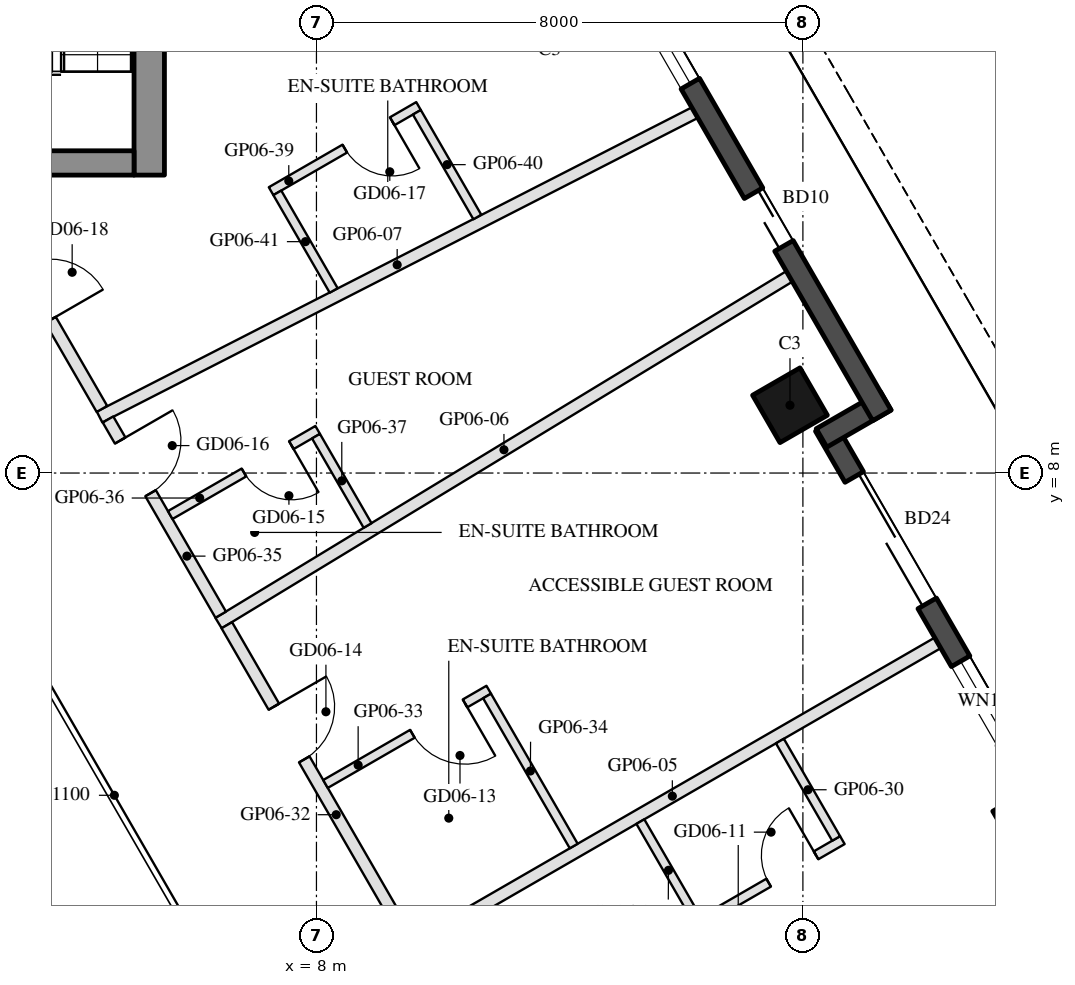
"""IFC4 building model, lengths in metres.
Left out: names, types, materials, properties, quantities, classifications, styles, units other than length and angle.
Written with IfcOpenShell. Run it as: python <this file> out.ifc"""

import sys

from ifc_helpers import new_model, si_unit, direction, frame, frame_2d, origin, origin_2d, place, context, subcontext, project, spatial, rectangle, hollow_rectangle, extrude, element, fill, save


model = new_model("IFC4")
c1 = context("Model", 3, precision=1e-05, world=origin(), true_north=direction((0.0, 1.0)))
c2 = subcontext(c1, "Body", "Model", "MODEL_VIEW")
j1 = project(units=[si_unit("LENGTHUNIT", "METRE"), si_unit("PLANEANGLEUNIT", "RADIAN")], contexts=[c1])
p1 = place(None, origin())
s1 = spatial("IfcSite", under=j1, at=p1, CompositionType="ELEMENT")
p2 = place(p1, origin())
s2 = spatial("IfcBuilding", under=s1, at=p2, CompositionType="ELEMENT")
p3 = place(p2, frame((0.0, 0.0, 87.2)))
s3 = spatial("IfcBuildingStorey", under=s2, at=p3, CompositionType="ELEMENT", Elevation=87.2)
for number, where, z_axis, x_axis in (
    (1, (19.738, 2.273, 0.0), (0.0, 0.0, 1.0), (-0.5, 0.866, 0.0)),
    (2, (15.788, 9.115, 0.0), (0.0, 0.0, 1.0), (-0.5, 0.866, 0.0)),
):
    element("IfcColumn", number, at=place(p3, frame(where, z_axis=z_axis, x_axis=x_axis)), inside=s3, PredefinedType="COLUMN", context=c2, shape_type="SweptSolid", body=[
        extrude(hollow_rectangle(XDim=0.9, YDim=0.9, WallThickness=0.04, at=origin_2d()), origin(), (0.0, 0.0, 1.0), 3.7),
    ])
p4 = place(p3, frame((19.729, 2.938, 0.0), z_axis=(0.0, 0.0, 1.0), x_axis=(-0.499976430342, 0.866039011305, 0.0)))
e3 = element("IfcWall", 3, at=p4, inside=s3, PredefinedType="SOLIDWALL", context=c2, shape_type="SweptSolid", body=[
    extrude(rectangle(XDim=6.74, YDim=0.35, at=frame_2d((3.37, 0.0))), origin(), (0.0, 0.0, 1.0), 3.55),
])
p5 = place(p4, frame((0.77, 0.0, 0.3)))
e4 = element("IfcOpeningElement", 4, at=p5, cuts=e3, PredefinedType="OPENING", context=c2, shape_type="SweptSolid", body=[
    extrude(rectangle(XDim=1.5, YDim=2.65, at=frame_2d((0.75, 1.325))), frame((0.0, 0.185, 0.0), z_axis=(0.0, -1.0, 0.0), x_axis=(1.0, 0.0, 0.0)), (0.0, 0.0, 1.0), 0.37),
])
p6 = place(p4, frame((3.37, 0.0, 0.0)))
e5 = element("IfcOpeningElement", 5, at=p6, cuts=e3, PredefinedType="OPENING", context=c2, shape_type="SweptSolid", body=[
    extrude(rectangle(XDim=2.4, YDim=2.4, at=frame_2d((1.2, 1.2))), frame((0.0, 0.185, 0.0), z_axis=(0.0, -1.0, 0.0), x_axis=(1.0, 0.0, 0.0)), (0.0, 0.0, 1.0), 0.37),
])
p7 = place(p3, frame((16.306, 8.577, 0.0), z_axis=(0.0, 0.0, 1.0), x_axis=(0.866092288191, 0.499884134912, 0.0)))
e6 = element("IfcWall", 6, at=p7, inside=s3, PredefinedType="SOLIDWALL", context=c2, shape_type="SweptSolid", body=[
    extrude(rectangle(XDim=1.22, YDim=0.35, at=frame_2d((0.61, 0.0))), origin(), (0.0, 0.0, 1.0), 3.55),
])
p8 = place(p3, frame((17.299, 8.948, 0.0), z_axis=(0.0, 0.0, 1.0), x_axis=(-0.500010041276, 0.866019606374, 0.0)))
e7 = element("IfcWall", 7, at=p8, inside=s3, PredefinedType="SOLIDWALL", context=c2, shape_type="SweptSolid", body=[
    extrude(rectangle(XDim=9.7, YDim=0.35, at=frame_2d((4.85, 0.0))), origin(), (0.0, 0.0, 1.0), 3.55),
])
p9 = place(p8, frame((3.22, 0.0, 0.0)))
e8 = element("IfcOpeningElement", 8, at=p9, cuts=e7, PredefinedType="OPENING", context=c2, shape_type="SweptSolid", body=[
    extrude(rectangle(XDim=1.0, YDim=2.4, at=frame_2d((0.5, 1.2))), frame((0.0, 0.185, 0.0), z_axis=(0.0, -1.0, 0.0), x_axis=(1.0, 0.0, 0.0)), (0.0, 0.0, 1.0), 0.37),
])
p10 = place(p8, frame((6.3, 0.0, 0.3)))
e9 = element("IfcOpeningElement", 9, at=p10, cuts=e7, PredefinedType="OPENING", context=c2, shape_type="SweptSolid", body=[
    extrude(rectangle(XDim=1.6, YDim=2.65, at=frame_2d((0.8, 1.325))), frame((0.0, 0.185, 0.0), z_axis=(0.0, -1.0, 0.0), x_axis=(1.0, 0.0, 0.0)), (0.0, 0.0, 1.0), 0.37),
])
p11 = place(p3, frame((5.25, 12.9, 0.0), z_axis=(0.0, 0.0, 1.0), x_axis=(0.0, 1.0, 0.0)))
e10 = element("IfcWall", 10, at=p11, inside=s3, PredefinedType="SHEAR", context=c2, shape_type="SweptSolid", body=[
    extrude(rectangle(XDim=14.837, YDim=0.5, at=frame_2d((7.418, 0.0))), origin(), (0.0, 0.0, 1.0), 3.5),
])
p12 = place(p3, frame((5.0, 13.1, 0.0), z_axis=(0.0, 0.0, 1.0), x_axis=(-1.0, 0.0, 0.0)))
e11 = element("IfcWall", 11, at=p12, inside=s3, PredefinedType="SHEAR", context=c2, shape_type="SweptSolid", body=[
    extrude(rectangle(XDim=10.0, YDim=0.4, at=frame_2d((5.0, 0.0))), origin(), (0.0, 0.0, 1.0), 3.5),
])
p13 = place(p12, frame((3.55, 0.0, 0.0)))
e12 = element("IfcOpeningElement", 12, at=p13, cuts=e11, PredefinedType="OPENING", context=c2, shape_type="SweptSolid", body=[
    extrude(rectangle(XDim=1.1, YDim=2.1, at=frame_2d((0.55, 1.05))), frame((0.0, 0.21, 0.0), z_axis=(0.0, -1.0, 0.0), x_axis=(1.0, 0.0, 0.0)), (0.0, 0.0, 1.0), 0.42),
])
p14 = place(p12, frame((5.85, 0.0, 0.0)))
e13 = element("IfcOpeningElement", 13, at=p14, cuts=e11, PredefinedType="OPENING", context=c2, shape_type="SweptSolid", body=[
    extrude(rectangle(XDim=1.4, YDim=2.1, at=frame_2d((0.7, 1.05))), frame((0.0, 0.21, 0.0), z_axis=(0.0, -1.0, 0.0), x_axis=(1.0, 0.0, 0.0)), (0.0, 0.0, 1.0), 0.42),
])
p15 = place(p3, frame((18.218, 5.206, 0.0), z_axis=(0.0, 0.0, 1.0), x_axis=(-0.866022637375, -0.500004791531, 0.0)))
e14 = element("IfcWall", 14, at=p15, inside=s3, PredefinedType="PARTITIONING", context=c2, shape_type="SweptSolid", body=[
    extrude(rectangle(XDim=10.08, YDim=0.2, at=frame_2d((5.04, 0.0))), origin(), (0.0, 0.0, 1.0), 2.96),
])
p16 = place(p3, frame((15.777, 11.233, 0.0), z_axis=(0.0, 0.0, 1.0), x_axis=(-0.854689239939, -0.519139964877, 0.0)))
e15 = element("IfcWall", 15, at=p16, inside=s3, PredefinedType="PARTITIONING", context=c2, shape_type="SweptSolid", body=[
    extrude(rectangle(XDim=10.983, YDim=0.2, at=frame_2d((5.491, 0.0))), origin(), (0.0, 0.0, 1.0), 2.96),
])
p17 = place(p3, frame((14.222, 13.927, 0.0), z_axis=(0.0, 0.0, 1.0), x_axis=(-0.890385282198, -0.455207699017, 0.0)))
e16 = element("IfcWall", 16, at=p17, inside=s3, PredefinedType="PARTITIONING", context=c2, shape_type="SweptSolid", body=[
    extrude(rectangle(XDim=10.994, YDim=0.2, at=frame_2d((5.497, 0.0))), origin(), (0.0, 0.0, 1.0), 2.96),
])
p18 = place(p3, frame((14.224, 0.562, 0.0), z_axis=(0.0, 0.0, 1.0), x_axis=(0.866018616679, 0.500011755427, 0.0)))
e17 = element("IfcWall", 17, at=p18, inside=s3, PredefinedType="PARTITIONING", context=c2, shape_type="SweptSolid", body=[
    extrude(rectangle(XDim=2.8, YDim=0.15, at=frame_2d((1.4, 0.0))), origin(), (0.0, 0.0, 1.0), 3.55),
])
p19 = place(p18, frame((1.4, 0.0, 0.0)))
e18 = element("IfcOpeningElement", 18, at=p19, cuts=e17, PredefinedType="OPENING", context=c2, shape_type="SweptSolid", body=[
    extrude(rectangle(XDim=0.9, YDim=2.1, at=frame_2d((0.45, 1.05))), frame((0.0, 0.085, 0.0), z_axis=(0.0, -1.0, 0.0), x_axis=(1.0, 0.0, 0.0)), (0.0, 0.0, 1.0), 0.17),
])
p20 = place(p3, frame((16.547, 1.99, 0.0), z_axis=(0.0, 0.0, 1.0), x_axis=(-0.499985172903, 0.866033964044, 0.0)))
e19 = element("IfcWall", 19, at=p20, inside=s3, PredefinedType="PARTITIONING", context=c2, shape_type="SweptSolid", body=[
    extrude(rectangle(XDim=1.85, YDim=0.15, at=frame_2d((0.925, 0.0))), origin(), (0.0, 0.0, 1.0), 3.55),
])
p21 = place(p3, frame((14.252, 0.665, 0.0), z_axis=(0.0, 0.0, 1.0), x_axis=(-0.500042316284, 0.866000971088, 0.0)))
e20 = element("IfcWall", 20, at=p21, inside=s3, PredefinedType="PARTITIONING", context=c2, shape_type="SweptSolid", body=[
    extrude(rectangle(XDim=1.85, YDim=0.15, at=frame_2d((0.925, 0.0))), origin(), (0.0, 0.0, 1.0), 3.55),
])
p22 = place(p3, frame((6.526, 5.497, 0.0), z_axis=(0.0, 0.0, 1.0), x_axis=(0.500026652407, -0.866010015463, 0.0)))
e21 = element("IfcWall", 21, at=p22, inside=s3, PredefinedType="PARTITIONING", context=c2, shape_type="SweptSolid", body=[
    extrude(rectangle(XDim=5.998, YDim=0.2, at=frame_2d((2.999, 0.0))), origin(), (0.0, 0.0, 1.0), 2.95),
])
p23 = place(p22, frame((1.548, 0.0, 0.0)))
e22 = element("IfcOpeningElement", 22, at=p23, cuts=e21, PredefinedType="OPENING", context=c2, shape_type="SweptSolid", body=[
    extrude(rectangle(XDim=1.0, YDim=2.1, at=frame_2d((0.5, 1.05))), frame((0.0, 0.11, 0.0), z_axis=(0.0, -1.0, 0.0), x_axis=(1.0, 0.0, 0.0)), (0.0, 0.0, 1.0), 0.22),
])
p24 = place(p3, frame((10.833, 4.436, 0.0), z_axis=(0.0, 0.0, 1.0), x_axis=(-0.86602952684, -0.49999285859, 0.0)))
e23 = element("IfcWall", 23, at=p24, inside=s3, PredefinedType="PARTITIONING", context=c2, shape_type="SweptSolid", body=[
    extrude(rectangle(XDim=3.1, YDim=0.15, at=frame_2d((1.55, 0.0))), origin(), (0.0, 0.0, 1.0), 3.55),
])
p25 = place(p24, frame((0.45, 0.0, 0.0)))
e24 = element("IfcOpeningElement", 24, at=p25, cuts=e23, PredefinedType="OPENING", context=c2, shape_type="SweptSolid", body=[
    extrude(rectangle(XDim=1.0, YDim=2.1, at=frame_2d((0.5, 1.05))), frame((0.0, 0.085, 0.0), z_axis=(0.0, -1.0, 0.0), x_axis=(1.0, 0.0, 0.0)), (0.0, 0.0, 1.0), 0.17),
])
p26 = place(p3, frame((12.231, 1.865, 0.0), z_axis=(0.0, 0.0, 1.0), x_axis=(-0.500036373335, 0.866004402611, 0.0)))
e25 = element("IfcWall", 25, at=p26, inside=s3, PredefinedType="PARTITIONING", context=c2, shape_type="SweptSolid", body=[
    extrude(rectangle(XDim=2.85, YDim=0.15, at=frame_2d((1.425, 0.0))), origin(), (0.0, 0.0, 1.0), 2.95),
])
p27 = place(p3, frame((4.572, 8.881, 0.0), z_axis=(0.0, 0.0, 1.0), x_axis=(0.500041684057, -0.866001336145, 0.0)))
e26 = element("IfcWall", 26, at=p27, inside=s3, PredefinedType="PARTITIONING", context=c2, shape_type="SweptSolid", body=[
    extrude(rectangle(XDim=3.707, YDim=0.2, at=frame_2d((1.854, 0.0))), origin(), (0.0, 0.0, 1.0), 2.95),
])
p28 = place(p27, frame((0.4, 0.0, 0.0)))
e27 = element("IfcOpeningElement", 27, at=p28, cuts=e26, PredefinedType="OPENING", context=c2, shape_type="SweptSolid", body=[
    extrude(rectangle(XDim=1.0, YDim=2.1, at=frame_2d((0.5, 1.05))), frame((0.0, 0.11, 0.0), z_axis=(0.0, -1.0, 0.0), x_axis=(1.0, 0.0, 0.0)), (0.0, 0.0, 1.0), 0.22),
])
p29 = place(p3, frame((8.02, 8.709, 0.0), z_axis=(0.0, 0.0, 1.0), x_axis=(-0.866034573852, -0.49998411664, 0.0)))
e28 = element("IfcWall", 28, at=p29, inside=s3, PredefinedType="PARTITIONING", context=c2, shape_type="SweptSolid", body=[
    extrude(rectangle(XDim=2.8, YDim=0.15, at=frame_2d((1.4, 0.0))), origin(), (0.0, 0.0, 1.0), 3.55),
])
p30 = place(p29, frame((0.5, 0.0, 0.0)))
e29 = element("IfcOpeningElement", 29, at=p30, cuts=e28, PredefinedType="OPENING", context=c2, shape_type="SweptSolid", body=[
    extrude(rectangle(XDim=0.9, YDim=2.1, at=frame_2d((0.45, 1.05))), frame((0.0, 0.085, 0.0), z_axis=(0.0, -1.0, 0.0), x_axis=(1.0, 0.0, 0.0)), (0.0, 0.0, 1.0), 0.17),
])
p31 = place(p3, frame((8.841, 7.137, 0.0), z_axis=(0.0, 0.0, 1.0), x_axis=(-0.500054617923, 0.865993867816, 0.0)))
e30 = element("IfcWall", 30, at=p31, inside=s3, PredefinedType="PARTITIONING", context=c2, shape_type="SweptSolid", body=[
    extrude(rectangle(XDim=1.697, YDim=0.15, at=frame_2d((0.848, 0.0))), origin(), (0.0, 0.0, 1.0), 3.55),
])
p32 = place(p3, frame((2.281, 12.85, 0.0), z_axis=(0.0, 0.0, 1.0), x_axis=(0.499973180286, -0.8660408876, 0.0)))
e31 = element("IfcWall", 31, at=p32, inside=s3, PredefinedType="PARTITIONING", context=c2, shape_type="SweptSolid", body=[
    extrude(rectangle(XDim=4.383, YDim=0.2, at=frame_2d((2.191, 0.0))), origin(), (0.0, 0.0, 1.0), 2.95),
])
p33 = place(p32, frame((1.691, 0.0, 0.0)))
e32 = element("IfcOpeningElement", 32, at=p33, cuts=e31, PredefinedType="OPENING", context=c2, shape_type="SweptSolid", body=[
    extrude(rectangle(XDim=1.0, YDim=2.1, at=frame_2d((0.5, 1.05))), frame((0.0, 0.11, 0.0), z_axis=(0.0, -1.0, 0.0), x_axis=(1.0, 0.0, 0.0)), (0.0, 0.0, 1.0), 0.22),
])
p34 = place(p3, frame((9.679, 14.036, 0.0), z_axis=(0.0, 0.0, 1.0), x_axis=(-0.865996816683, -0.500049511043, 0.0)))
e33 = element("IfcWall", 33, at=p34, inside=s3, PredefinedType="PARTITIONING", context=c2, shape_type="SweptSolid", body=[
    extrude(rectangle(XDim=2.8, YDim=0.15, at=frame_2d((1.4, 0.0))), origin(), (0.0, 0.0, 1.0), 3.55),
])
p35 = place(p34, frame((0.5, 0.0, 0.0)))
e34 = element("IfcOpeningElement", 34, at=p35, cuts=e33, PredefinedType="OPENING", context=c2, shape_type="SweptSolid", body=[
    extrude(rectangle(XDim=0.9, YDim=2.1, at=frame_2d((0.45, 1.05))), frame((0.0, 0.085, 0.0), z_axis=(0.0, -1.0, 0.0), x_axis=(1.0, 0.0, 0.0)), (0.0, 0.0, 1.0), 0.17),
])
p36 = place(p3, frame((10.646, 12.211, 0.0), z_axis=(0.0, 0.0, 1.0), x_axis=(-0.50001992892, 0.866013897511, 0.0)))
e35 = element("IfcWall", 35, at=p36, inside=s3, PredefinedType="PARTITIONING", context=c2, shape_type="SweptSolid", body=[
    extrude(rectangle(XDim=1.989, YDim=0.15, at=frame_2d((0.995, 0.0))), origin(), (0.0, 0.0, 1.0), 3.55),
])
p37 = place(p3, frame((8.283, 11.003, 0.0), z_axis=(0.0, 0.0, 1.0), x_axis=(-0.499935264145, 0.866062775822, 0.0)))
e36 = element("IfcWall", 36, at=p37, inside=s3, PredefinedType="PARTITIONING", context=c2, shape_type="SweptSolid", body=[
    extrude(rectangle(XDim=1.854, YDim=0.15, at=frame_2d((0.927, 0.0))), origin(), (0.0, 0.0, 1.0), 3.55),
])
p38 = place(p5, origin())
e37 = element("IfcWindow", 37, at=p38, inside=s3, PartitioningType="SINGLE_PANEL", PredefinedType="WINDOW", context=c2, shape_type="SweptSolid", body=[
    extrude(rectangle(XDim=1.5, YDim=2.65, at=frame_2d((0.75, 1.325))), frame((0.0, 0.03, 0.0), z_axis=(0.0, -1.0, 0.0), x_axis=(1.0, 0.0, 0.0)), (0.0, 0.0, 1.0), 0.06),
])
fill(e4, e37)
p39 = place(p6, frame((2.4, 0.0, 0.0), z_axis=(0.0, 0.0, 1.0), x_axis=(-1.0, 0.0, 0.0)))
e38 = element("IfcDoor", 38, at=p39, inside=s3, OperationType="SLIDING_TO_LEFT", PredefinedType="DOOR", context=c2, shape_type="SweptSolid", body=[
    extrude(rectangle(XDim=2.4, YDim=2.4, at=frame_2d((1.2, 1.2))), frame((0.0, 0.025, 0.0), z_axis=(0.0, -1.0, 0.0), x_axis=(1.0, 0.0, 0.0)), (0.0, 0.0, 1.0), 0.05),
])
fill(e5, e38)
p40 = place(p9, frame((1.0, 0.0, 0.0), z_axis=(0.0, 0.0, 1.0), x_axis=(-1.0, 0.0, 0.0)))
e39 = element("IfcDoor", 39, at=p40, inside=s3, OperationType="SLIDING_TO_LEFT", PredefinedType="DOOR", context=c2, shape_type="SweptSolid", body=[
    extrude(rectangle(XDim=1.0, YDim=2.4, at=frame_2d((0.5, 1.2))), frame((0.0, 0.025, 0.0), z_axis=(0.0, -1.0, 0.0), x_axis=(1.0, 0.0, 0.0)), (0.0, 0.0, 1.0), 0.05),
])
fill(e8, e39)
p41 = place(p10, origin())
e40 = element("IfcWindow", 40, at=p41, inside=s3, PartitioningType="SINGLE_PANEL", PredefinedType="WINDOW", context=c2, shape_type="SweptSolid", body=[
    extrude(rectangle(XDim=1.6, YDim=2.65, at=frame_2d((0.8, 1.325))), frame((0.0, 0.03, 0.0), z_axis=(0.0, -1.0, 0.0), x_axis=(1.0, 0.0, 0.0)), (0.0, 0.0, 1.0), 0.06),
])
fill(e9, e40)
p42 = place(p19, origin())
e41 = element("IfcDoor", 41, at=p42, inside=s3, OperationType="SINGLE_SWING_RIGHT", PredefinedType="DOOR", context=c2, shape_type="SweptSolid", body=[
    extrude(rectangle(XDim=0.9, YDim=2.1, at=frame_2d((0.45, 1.05))), frame((0.0, 0.025, 0.0), z_axis=(0.0, -1.0, 0.0), x_axis=(1.0, 0.0, 0.0)), (0.0, 0.0, 1.0), 0.05),
])
fill(e18, e41)
p43 = place(p25, origin())
e42 = element("IfcDoor", 42, at=p43, inside=s3, OperationType="SINGLE_SWING_LEFT", PredefinedType="DOOR", context=c2, shape_type="SweptSolid", body=[
    extrude(rectangle(XDim=1.0, YDim=2.1, at=frame_2d((0.5, 1.05))), frame((0.0, 0.025, 0.0), z_axis=(0.0, -1.0, 0.0), x_axis=(1.0, 0.0, 0.0)), (0.0, 0.0, 1.0), 0.05),
])
fill(e24, e42)
p44 = place(p23, origin())
e43 = element("IfcDoor", 43, at=p44, inside=s3, OperationType="SINGLE_SWING_LEFT", PredefinedType="DOOR", context=c2, shape_type="SweptSolid", body=[
    extrude(rectangle(XDim=1.0, YDim=2.1, at=frame_2d((0.5, 1.05))), frame((0.0, 0.025, 0.0), z_axis=(0.0, -1.0, 0.0), x_axis=(1.0, 0.0, 0.0)), (0.0, 0.0, 1.0), 0.05),
])
fill(e22, e43)
p45 = place(p30, origin())
e44 = element("IfcDoor", 44, at=p45, inside=s3, OperationType="SINGLE_SWING_LEFT", PredefinedType="DOOR", context=c2, shape_type="SweptSolid", body=[
    extrude(rectangle(XDim=0.9, YDim=2.1, at=frame_2d((0.45, 1.05))), frame((0.0, 0.025, 0.0), z_axis=(0.0, -1.0, 0.0), x_axis=(1.0, 0.0, 0.0)), (0.0, 0.0, 1.0), 0.05),
])
fill(e29, e44)
p46 = place(p28, origin())
e45 = element("IfcDoor", 45, at=p46, inside=s3, OperationType="SINGLE_SWING_LEFT", PredefinedType="DOOR", context=c2, shape_type="SweptSolid", body=[
    extrude(rectangle(XDim=1.0, YDim=2.1, at=frame_2d((0.5, 1.05))), frame((0.0, 0.025, 0.0), z_axis=(0.0, -1.0, 0.0), x_axis=(1.0, 0.0, 0.0)), (0.0, 0.0, 1.0), 0.05),
])
fill(e27, e45)
p47 = place(p35, origin())
e46 = element("IfcDoor", 46, at=p47, inside=s3, OperationType="SINGLE_SWING_LEFT", PredefinedType="DOOR", context=c2, shape_type="SweptSolid", body=[
    extrude(rectangle(XDim=0.9, YDim=2.1, at=frame_2d((0.45, 1.05))), frame((0.0, 0.025, 0.0), z_axis=(0.0, -1.0, 0.0), x_axis=(1.0, 0.0, 0.0)), (0.0, 0.0, 1.0), 0.05),
])
fill(e34, e46)
save(model, sys.argv[1])
